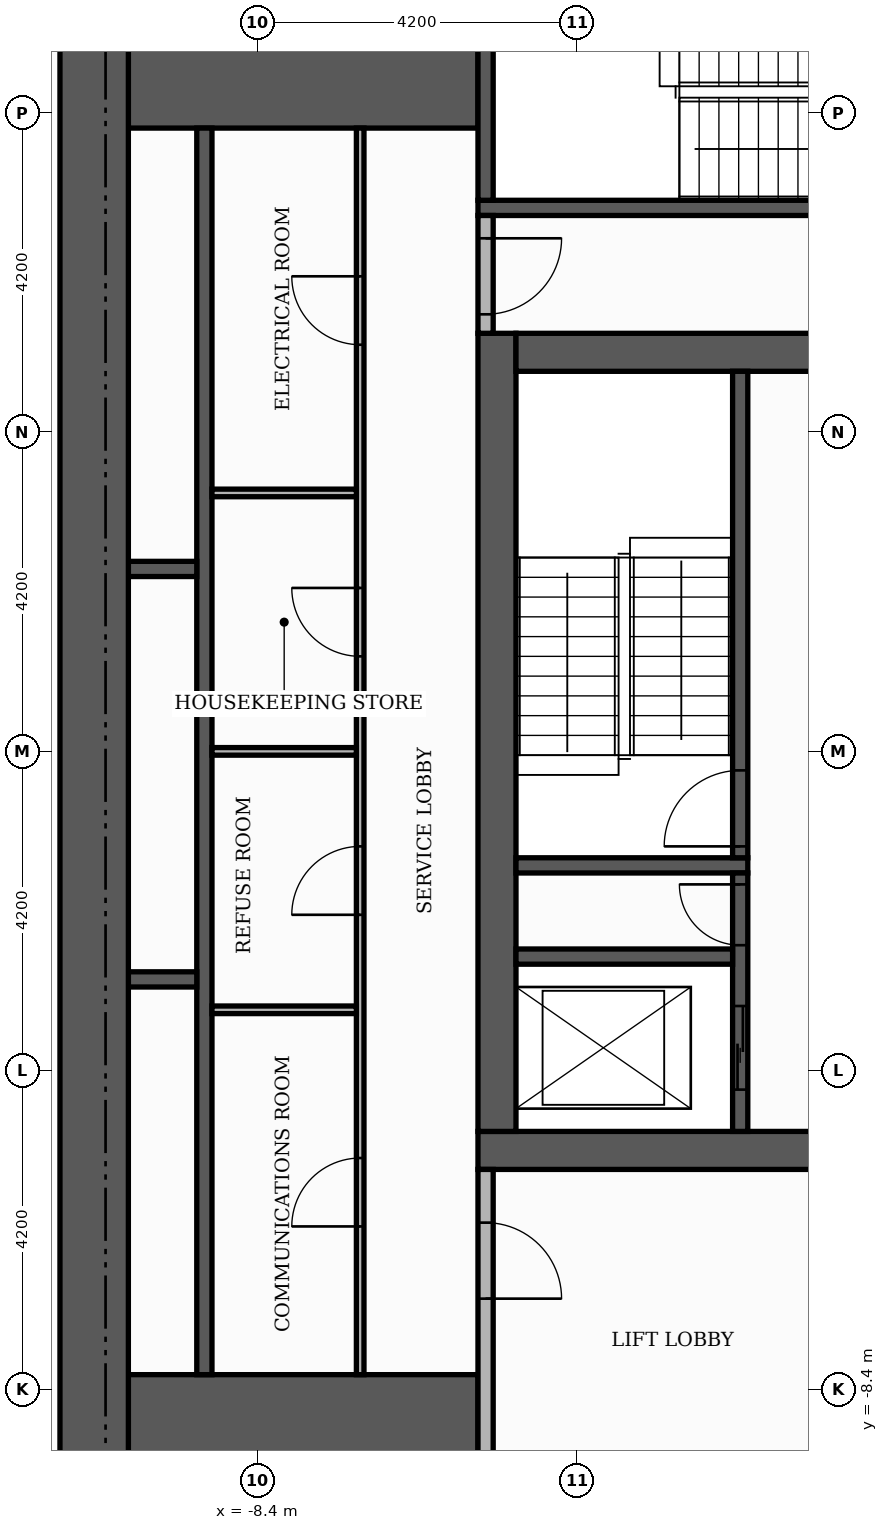
"""IFC4 building model, lengths in metres.
Left out: names, types, materials, properties, quantities, classifications, styles, units other than length and angle.
Written with IfcOpenShell. Run it as: python <this file> out.ifc"""

import sys

from ifc_helpers import new_model, si_unit, direction, frame, frame_2d, origin, place, context, subcontext, project, spatial, rectangle, extrude, element, fill, save


model = new_model("IFC4")
c1 = context("Model", 3, precision=1e-05, world=origin(), true_north=direction((0.0, 1.0)))
c2 = subcontext(c1, "Body", "Model", "MODEL_VIEW")
j1 = project(units=[si_unit("LENGTHUNIT", "METRE"), si_unit("PLANEANGLEUNIT", "RADIAN")], contexts=[c1])
p1 = place(None, origin())
s1 = spatial("IfcSite", under=j1, at=p1, CompositionType="ELEMENT")
p2 = place(p1, origin())
s2 = spatial("IfcBuilding", under=s1, at=p2, CompositionType="ELEMENT")
p3 = place(p2, frame((0.0, 0.0, 211.8)))
s3 = spatial("IfcBuildingStorey", under=s2, at=p3, CompositionType="ELEMENT", Elevation=211.8)
p4 = place(p3, frame((-5.5, -5.25, 0.0), z_axis=(0.0, 0.0, 1.0), x_axis=(1.0, 0.0, 0.0)))
e1 = element("IfcWall", 1, at=p4, inside=s3, PredefinedType="SHEAR", context=c2, shape_type="SweptSolid", body=[
    extrude(rectangle(XDim=11.0, YDim=0.5, at=frame_2d((5.5, 0.0))), origin(), (0.0, 0.0, 1.0), 3.48),
])
p5 = place(p4, frame((4.9, 0.0, 0.0)))
e2 = element("IfcOpeningElement", 2, at=p5, cuts=e1, PredefinedType="OPENING", context=c2, shape_type="SweptSolid", body=[
    extrude(rectangle(XDim=1.2, YDim=2.1, at=frame_2d((0.6, 1.05))), frame((0.0, 0.26, 0.0), z_axis=(0.0, -1.0, 0.0), x_axis=(1.0, 0.0, 0.0)), (0.0, 0.0, 1.0), 0.52),
])
p6 = place(p3, frame((-5.25, -5.0, 0.0), z_axis=(0.0, 0.0, 1.0), x_axis=(0.0, 1.0, 0.0)))
e3 = element("IfcWall", 3, at=p6, inside=s3, PredefinedType="SHEAR", context=c2, shape_type="SweptSolid", body=[
    extrude(rectangle(XDim=10.5, YDim=0.5, at=frame_2d((5.25, 0.0))), origin(), (0.0, 0.0, 1.0), 3.48),
])
p7 = place(p3, frame((-5.0, 5.25, 0.0), z_axis=(0.0, 0.0, 1.0), x_axis=(1.0, 0.0, 0.0)))
e4 = element("IfcWall", 4, at=p7, inside=s3, PredefinedType="SHEAR", context=c2, shape_type="SweptSolid", body=[
    extrude(rectangle(XDim=10.0, YDim=0.5, at=frame_2d((5.0, 0.0))), origin(), (0.0, 0.0, 1.0), 3.48),
])
p8 = place(p7, frame((4.4, 0.0, 0.0)))
e5 = element("IfcOpeningElement", 5, at=p8, cuts=e4, PredefinedType="OPENING", context=c2, shape_type="SweptSolid", body=[
    extrude(rectangle(XDim=1.2, YDim=2.1, at=frame_2d((0.6, 1.05))), frame((0.0, 0.26, 0.0), z_axis=(0.0, -1.0, 0.0), x_axis=(1.0, 0.0, 0.0)), (0.0, 0.0, 1.0), 0.52),
])
for number, where, z_axis, x_axis in (
    (6, (-10.1, -9.15, 0.0), (0.0, 0.0, 1.0), (1.0, 0.0, 0.0)),
    (7, (-10.1, 9.15, 0.0), (0.0, 0.0, 1.0), (1.0, 0.0, 0.0)),
):
    element("IfcWall", number, at=place(p3, frame(where, z_axis=z_axis, x_axis=x_axis)), inside=s3, PredefinedType="SHEAR", context=c2, shape_type="SweptSolid", body=[
        extrude(rectangle(XDim=4.6, YDim=1.9, at=frame_2d((2.3, 0.0))), origin(), (0.0, 0.0, 1.0), 3.48),
    ])
p9 = place(p3, frame((-5.0, -1.5, 0.0), z_axis=(0.0, 0.0, 1.0), x_axis=(1.0, 0.0, 0.0)))
e8 = element("IfcWall", 8, at=p9, inside=s3, PredefinedType="SHEAR", context=c2, shape_type="SweptSolid", body=[
    extrude(rectangle(XDim=3.05, YDim=0.2, at=frame_2d((1.525, 0.0))), origin(), (0.0, 0.0, 1.0), 3.48),
])
p10 = place(p3, frame((-2.05, -1.4, 0.0), z_axis=(0.0, 0.0, 1.0), x_axis=(0.0, 1.0, 0.0)))
e9 = element("IfcWall", 9, at=p10, inside=s3, PredefinedType="SHEAR", context=c2, shape_type="SweptSolid", body=[
    extrude(rectangle(XDim=6.4, YDim=0.2, at=frame_2d((3.2, 0.0))), origin(), (0.0, 0.0, 1.0), 3.48),
])
p11 = place(p10, frame((0.15, 0.0, 0.0)))
e10 = element("IfcOpeningElement", 10, at=p11, cuts=e9, PredefinedType="OPENING", context=c2, shape_type="SweptSolid", body=[
    extrude(rectangle(XDim=1.0, YDim=2.1, at=frame_2d((0.5, 1.05))), frame((0.0, 0.11, 0.0), z_axis=(0.0, -1.0, 0.0), x_axis=(1.0, 0.0, 0.0)), (0.0, 0.0, 1.0), 0.22),
])
p12 = place(p3, frame((-5.5, 7.15, 0.0), z_axis=(0.0, 0.0, 1.0), x_axis=(1.0, 0.0, 0.0)))
e11 = element("IfcWall", 11, at=p12, inside=s3, PredefinedType="SHEAR", context=c2, shape_type="SweptSolid", body=[
    extrude(rectangle(XDim=6.8, YDim=0.2, at=frame_2d((3.4, 0.0))), origin(), (0.0, 0.0, 1.0), 3.48),
])
p13 = place(p3, frame((-5.4, 7.25, 0.0), z_axis=(0.0, 0.0, 1.0), x_axis=(0.0, 1.0, 0.0)))
e12 = element("IfcWall", 12, at=p13, inside=s3, PredefinedType="SHEAR", context=c2, shape_type="SweptSolid", body=[
    extrude(rectangle(XDim=2.85, YDim=0.2, at=frame_2d((1.425, 0.0))), origin(), (0.0, 0.0, 1.0), 3.48),
])
p14 = place(p3, frame((-9.1, -8.2, 0.0), z_axis=(0.0, 0.0, 1.0), x_axis=(0.0, 1.0, 0.0)))
e13 = element("IfcWall", 13, at=p14, inside=s3, PredefinedType="SHEAR", context=c2, shape_type="SweptSolid", body=[
    extrude(rectangle(XDim=16.4, YDim=0.2, at=frame_2d((8.2, 0.0))), origin(), (0.0, 0.0, 1.0), 3.48),
])
p15 = place(p3, frame((-2.05, -5.0, 0.0), z_axis=(0.0, 0.0, 1.0), x_axis=(0.0, 1.0, 0.0)))
e14 = element("IfcWall", 14, at=p15, inside=s3, PredefinedType="SHEAR", context=c2, shape_type="SweptSolid", body=[
    extrude(rectangle(XDim=3.4, YDim=0.2, at=frame_2d((1.7, 0.0))), origin(), (0.0, 0.0, 1.0), 3.48),
])
p16 = place(p15, frame((0.55, 0.0, 0.0)))
e15 = element("IfcOpeningElement", 15, at=p16, cuts=e14, PredefinedType="OPENING", context=c2, shape_type="SweptSolid", body=[
    extrude(rectangle(XDim=1.1, YDim=2.1, at=frame_2d((0.55, 1.05))), frame((0.0, 0.11, 0.0), z_axis=(0.0, -1.0, 0.0), x_axis=(1.0, 0.0, 0.0)), (0.0, 0.0, 1.0), 0.22),
])
p17 = place(p15, frame((2.45, 0.0, 0.0)))
e16 = element("IfcOpeningElement", 16, at=p17, cuts=e14, PredefinedType="OPENING", context=c2, shape_type="SweptSolid", body=[
    extrude(rectangle(XDim=0.8, YDim=2.1, at=frame_2d((0.4, 1.05))), frame((0.0, 0.11, 0.0), z_axis=(0.0, -1.0, 0.0), x_axis=(1.0, 0.0, 0.0)), (0.0, 0.0, 1.0), 0.22),
])
p18 = place(p3, frame((-10.1, -3.0, 0.0), z_axis=(0.0, 0.0, 1.0), x_axis=(1.0, 0.0, 0.0)))
e17 = element("IfcWall", 17, at=p18, inside=s3, PredefinedType="SHEAR", context=c2, shape_type="SweptSolid", body=[
    extrude(rectangle(XDim=0.9, YDim=0.2, at=frame_2d((0.45, 0.0))), origin(), (0.0, 0.0, 1.0), 3.48),
])
p19 = place(p3, frame((-5.0, -2.7, 0.0), z_axis=(0.0, 0.0, 1.0), x_axis=(1.0, 0.0, 0.0)))
e18 = element("IfcWall", 18, at=p19, inside=s3, PredefinedType="SHEAR", context=c2, shape_type="SweptSolid", body=[
    extrude(rectangle(XDim=2.85, YDim=0.2, at=frame_2d((1.425, 0.0))), origin(), (0.0, 0.0, 1.0), 3.48),
])
p20 = place(p3, frame((-10.1, 2.4, 0.0), z_axis=(0.0, 0.0, 1.0), x_axis=(1.0, 0.0, 0.0)))
e19 = element("IfcWall", 19, at=p20, inside=s3, PredefinedType="SHEAR", context=c2, shape_type="SweptSolid", body=[
    extrude(rectangle(XDim=0.9, YDim=0.2, at=frame_2d((0.45, 0.0))), origin(), (0.0, 0.0, 1.0), 3.48),
])
p21 = place(p3, frame((-10.55, -10.1, 0.0), z_axis=(0.0, 0.0, 1.0), x_axis=(0.0, 1.0, 0.0)))
e20 = element("IfcWall", 20, at=p21, inside=s3, PredefinedType="SHEAR", context=c2, shape_type="SweptSolid", body=[
    extrude(rectangle(XDim=20.2, YDim=0.9, at=frame_2d((10.1, 0.0))), origin(), (0.0, 0.0, 1.0), 3.48),
])
p22 = place(p3, frame((-5.4, -10.1, 0.0), z_axis=(0.0, 0.0, 1.0), x_axis=(0.0, 1.0, 0.0)))
e21 = element("IfcWall", 21, at=p22, inside=s3, PredefinedType="PARTITIONING", context=c2, shape_type="SweptSolid", body=[
    extrude(rectangle(XDim=4.6, YDim=0.2, at=frame_2d((2.3, 0.0))), origin(), (0.0, 0.0, 1.0), 3.48),
])
p23 = place(p22, frame((2.9, 0.0, 0.0)))
e22 = element("IfcOpeningElement", 22, at=p23, cuts=e21, PredefinedType="OPENING", context=c2, shape_type="SweptSolid", body=[
    extrude(rectangle(XDim=1.0, YDim=2.1, at=frame_2d((0.5, 1.05))), frame((0.0, 0.11, 0.0), z_axis=(0.0, -1.0, 0.0), x_axis=(1.0, 0.0, 0.0)), (0.0, 0.0, 1.0), 0.22),
])
p24 = place(p3, frame((-7.05, -8.2, 0.0), z_axis=(0.0, 0.0, 1.0), x_axis=(0.0, 1.0, 0.0)))
e23 = element("IfcWall", 23, at=p24, inside=s3, PredefinedType="PARTITIONING", context=c2, shape_type="SweptSolid", body=[
    extrude(rectangle(XDim=16.4, YDim=0.1, at=frame_2d((8.2, 0.0))), origin(), (0.0, 0.0, 1.0), 3.48),
])
p25 = place(p24, frame((1.95, 0.0, 0.0)))
e24 = element("IfcOpeningElement", 24, at=p25, cuts=e23, PredefinedType="OPENING", context=c2, shape_type="SweptSolid", body=[
    extrude(rectangle(XDim=0.9, YDim=2.1, at=frame_2d((0.45, 1.05))), frame((0.0, 0.06, 0.0), z_axis=(0.0, -1.0, 0.0), x_axis=(1.0, 0.0, 0.0)), (0.0, 0.0, 1.0), 0.12),
])
p26 = place(p24, frame((6.05, 0.0, 0.0)))
e25 = element("IfcOpeningElement", 25, at=p26, cuts=e23, PredefinedType="OPENING", context=c2, shape_type="SweptSolid", body=[
    extrude(rectangle(XDim=0.9, YDim=2.1, at=frame_2d((0.45, 1.05))), frame((0.0, 0.06, 0.0), z_axis=(0.0, -1.0, 0.0), x_axis=(1.0, 0.0, 0.0)), (0.0, 0.0, 1.0), 0.12),
])
p27 = place(p24, frame((9.45, 0.0, 0.0)))
e26 = element("IfcOpeningElement", 26, at=p27, cuts=e23, PredefinedType="OPENING", context=c2, shape_type="SweptSolid", body=[
    extrude(rectangle(XDim=0.9, YDim=2.1, at=frame_2d((0.45, 1.05))), frame((0.0, 0.06, 0.0), z_axis=(0.0, -1.0, 0.0), x_axis=(1.0, 0.0, 0.0)), (0.0, 0.0, 1.0), 0.12),
])
p28 = place(p24, frame((13.55, 0.0, 0.0)))
e27 = element("IfcOpeningElement", 27, at=p28, cuts=e23, PredefinedType="OPENING", context=c2, shape_type="SweptSolid", body=[
    extrude(rectangle(XDim=0.9, YDim=2.1, at=frame_2d((0.45, 1.05))), frame((0.0, 0.06, 0.0), z_axis=(0.0, -1.0, 0.0), x_axis=(1.0, 0.0, 0.0)), (0.0, 0.0, 1.0), 0.12),
])
for number, where, z_axis, x_axis in (
    (28, (-9.0, -3.4, 0.0), (0.0, 0.0, 1.0), (1.0, 0.0, 0.0)),
    (29, (-9.0, 0.0, 0.0), (0.0, 0.0, 1.0), (1.0, 0.0, 0.0)),
    (30, (-9.0, 3.4, 0.0), (0.0, 0.0, 1.0), (1.0, 0.0, 0.0)),
):
    element("IfcWall", number, at=place(p3, frame(where, z_axis=z_axis, x_axis=x_axis)), inside=s3, PredefinedType="PARTITIONING", context=c2, shape_type="SweptSolid", body=[
        extrude(rectangle(XDim=1.9, YDim=0.1, at=frame_2d((0.95, 0.0))), origin(), (0.0, 0.0, 1.0), 3.48),
    ])
p29 = place(p3, frame((-5.4, 5.5, 0.0), z_axis=(0.0, 0.0, 1.0), x_axis=(0.0, 1.0, 0.0)))
e31 = element("IfcWall", 31, at=p29, inside=s3, PredefinedType="PARTITIONING", context=c2, shape_type="SweptSolid", body=[
    extrude(rectangle(XDim=1.55, YDim=0.2, at=frame_2d((0.775, 0.0))), origin(), (0.0, 0.0, 1.0), 3.48),
])
p30 = place(p29, frame((0.25, 0.0, 0.0)))
e32 = element("IfcOpeningElement", 32, at=p30, cuts=e31, PredefinedType="OPENING", context=c2, shape_type="SweptSolid", body=[
    extrude(rectangle(XDim=1.0, YDim=2.1, at=frame_2d((0.5, 1.05))), frame((0.0, 0.11, 0.0), z_axis=(0.0, -1.0, 0.0), x_axis=(1.0, 0.0, 0.0)), (0.0, 0.0, 1.0), 0.22),
])
p31 = place(p16, origin())
e33 = element("IfcDoor", 33, at=p31, inside=s3, OperationType="SLIDING_TO_LEFT", PredefinedType="DOOR", context=c2, shape_type="SweptSolid", body=[
    extrude(rectangle(XDim=1.1, YDim=2.1, at=frame_2d((0.55, 1.05))), frame((0.0, 0.025, 0.0), z_axis=(0.0, -1.0, 0.0), x_axis=(1.0, 0.0, 0.0)), (0.0, 0.0, 1.0), 0.05),
])
fill(e15, e33)
p32 = place(p11, origin())
e34 = element("IfcDoor", 34, at=p32, inside=s3, OperationType="SINGLE_SWING_LEFT", PredefinedType="DOOR", context=c2, shape_type="SweptSolid", body=[
    extrude(rectangle(XDim=1.0, YDim=2.1, at=frame_2d((0.5, 1.05))), frame((0.0, 0.025, 0.0), z_axis=(0.0, -1.0, 0.0), x_axis=(1.0, 0.0, 0.0)), (0.0, 0.0, 1.0), 0.05),
])
fill(e10, e34)
p33 = place(p17, origin())
e35 = element("IfcDoor", 35, at=p33, inside=s3, OperationType="SINGLE_SWING_RIGHT", PredefinedType="DOOR", context=c2, shape_type="SweptSolid", body=[
    extrude(rectangle(XDim=0.8, YDim=2.1, at=frame_2d((0.4, 1.05))), frame((0.0, 0.025, 0.0), z_axis=(0.0, -1.0, 0.0), x_axis=(1.0, 0.0, 0.0)), (0.0, 0.0, 1.0), 0.05),
])
fill(e16, e35)
p34 = place(p30, frame((1.0, 0.0, 0.0), z_axis=(0.0, 0.0, 1.0), x_axis=(-1.0, 0.0, 0.0)))
e36 = element("IfcDoor", 36, at=p34, inside=s3, OperationType="SINGLE_SWING_RIGHT", PredefinedType="DOOR", context=c2, shape_type="SweptSolid", body=[
    extrude(rectangle(XDim=1.0, YDim=2.1, at=frame_2d((0.5, 1.05))), frame((0.0, 0.025, 0.0), z_axis=(0.0, -1.0, 0.0), x_axis=(1.0, 0.0, 0.0)), (0.0, 0.0, 1.0), 0.05),
])
fill(e32, e36)
p35 = place(p23, frame((1.0, 0.0, 0.0), z_axis=(0.0, 0.0, 1.0), x_axis=(-1.0, 0.0, 0.0)))
e37 = element("IfcDoor", 37, at=p35, inside=s3, OperationType="SINGLE_SWING_LEFT", PredefinedType="DOOR", context=c2, shape_type="SweptSolid", body=[
    extrude(rectangle(XDim=1.0, YDim=2.1, at=frame_2d((0.5, 1.05))), frame((0.0, 0.025, 0.0), z_axis=(0.0, -1.0, 0.0), x_axis=(1.0, 0.0, 0.0)), (0.0, 0.0, 1.0), 0.05),
])
fill(e22, e37)
p36 = place(p25, origin())
e38 = element("IfcDoor", 38, at=p36, inside=s3, OperationType="SINGLE_SWING_LEFT", PredefinedType="DOOR", context=c2, shape_type="SweptSolid", body=[
    extrude(rectangle(XDim=0.9, YDim=2.1, at=frame_2d((0.45, 1.05))), frame((0.0, 0.025, 0.0), z_axis=(0.0, -1.0, 0.0), x_axis=(1.0, 0.0, 0.0)), (0.0, 0.0, 1.0), 0.05),
])
fill(e24, e38)
p37 = place(p26, origin())
e39 = element("IfcDoor", 39, at=p37, inside=s3, OperationType="SINGLE_SWING_LEFT", PredefinedType="DOOR", context=c2, shape_type="SweptSolid", body=[
    extrude(rectangle(XDim=0.9, YDim=2.1, at=frame_2d((0.45, 1.05))), frame((0.0, 0.025, 0.0), z_axis=(0.0, -1.0, 0.0), x_axis=(1.0, 0.0, 0.0)), (0.0, 0.0, 1.0), 0.05),
])
fill(e25, e39)
p38 = place(p27, origin())
e40 = element("IfcDoor", 40, at=p38, inside=s3, OperationType="SINGLE_SWING_RIGHT", PredefinedType="DOOR", context=c2, shape_type="SweptSolid", body=[
    extrude(rectangle(XDim=0.9, YDim=2.1, at=frame_2d((0.45, 1.05))), frame((0.0, 0.025, 0.0), z_axis=(0.0, -1.0, 0.0), x_axis=(1.0, 0.0, 0.0)), (0.0, 0.0, 1.0), 0.05),
])
fill(e26, e40)
p39 = place(p28, origin())
e41 = element("IfcDoor", 41, at=p39, inside=s3, OperationType="SINGLE_SWING_RIGHT", PredefinedType="DOOR", context=c2, shape_type="SweptSolid", body=[
    extrude(rectangle(XDim=0.9, YDim=2.1, at=frame_2d((0.45, 1.05))), frame((0.0, 0.025, 0.0), z_axis=(0.0, -1.0, 0.0), x_axis=(1.0, 0.0, 0.0)), (0.0, 0.0, 1.0), 0.05),
])
fill(e27, e41)
save(model, sys.argv[1])
